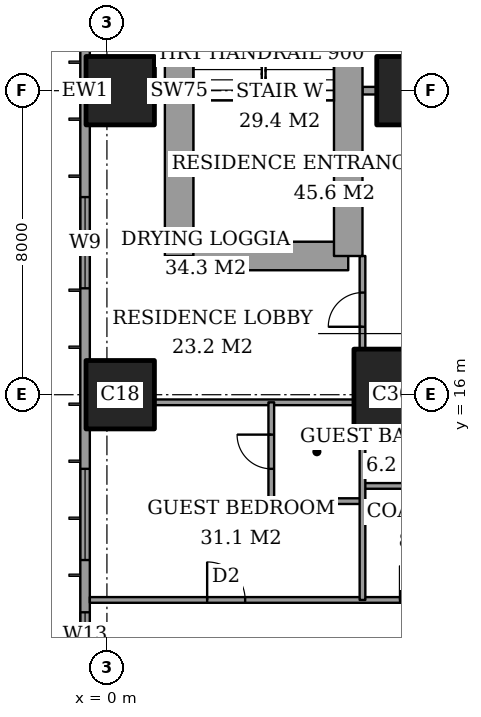
"""IFC4 building model, lengths in metres.
Left out: names, types, materials, properties, quantities, classifications, styles, units other than length and angle.
Written with IfcOpenShell. Run it as: python <this file> out.ifc"""

import sys

from ifc_helpers import new_model, si_unit, direction, frame, frame_2d, origin, origin_2d, place, context, subcontext, project, spatial, rectangle, extrude, element, fill, save


model = new_model("IFC4")
c1 = context("Model", 3, precision=1e-05, world=origin(), true_north=direction((0.0, 1.0)))
c2 = subcontext(c1, "Body", "Model", "MODEL_VIEW")
j1 = project(units=[si_unit("LENGTHUNIT", "METRE"), si_unit("PLANEANGLEUNIT", "RADIAN")], contexts=[c1])
p1 = place(None, origin())
s1 = spatial("IfcSite", under=j1, at=p1, CompositionType="ELEMENT")
p2 = place(p1, origin())
s2 = spatial("IfcBuilding", under=s1, at=p2, CompositionType="ELEMENT")
p3 = place(p2, frame((0.0, 0.0, 196.6)))
s3 = spatial("IfcBuildingStorey", under=s2, at=p3, CompositionType="ELEMENT", Elevation=196.6)
for number, where, z_axis, x_axis in (
    (1, (0.35, 16.0, 0.0), (0.0, 0.0, 1.0), (1.0, 0.0, 0.0)),
    (2, (0.35, 24.0, 0.0), (0.0, 0.0, 1.0), (1.0, 0.0, 0.0)),
):
    element("IfcColumn", number, at=place(p3, frame(where, z_axis=z_axis, x_axis=x_axis)), inside=s3, PredefinedType="COLUMN", context=c2, shape_type="SweptSolid", body=[
        extrude(rectangle(XDim=1.8, YDim=1.8, at=origin_2d()), origin(), (0.0, 0.0, 1.0), 3.6),
    ])
p4 = place(p3, frame((8.0, 16.0, 0.0), z_axis=(0.0, 0.0, 1.0), x_axis=(1.0, 0.0, 0.0)))
e3 = element("IfcColumn", 3, at=p4, inside=s3, PredefinedType="COLUMN", context=c2, shape_type="SweptSolid", body=[
    extrude(rectangle(XDim=3.0, YDim=2.4, at=origin_2d()), origin(), (0.0, 0.0, 1.0), 3.6),
])
p5 = place(p3, frame((8.0, 24.0, 0.0), z_axis=(0.0, 0.0, 1.0), x_axis=(1.0, 0.0, 0.0)))
e4 = element("IfcColumn", 4, at=p5, inside=s3, PredefinedType="COLUMN", context=c2, shape_type="SweptSolid", body=[
    extrude(rectangle(XDim=1.8, YDim=1.8, at=origin_2d()), origin(), (0.0, 0.0, 1.0), 3.6),
])
p6 = place(p3, frame((1.9, 19.65, 0.0), z_axis=(0.0, 0.0, 1.0), x_axis=(1.0, 0.0, 0.0)))
e5 = element("IfcWall", 5, at=p6, inside=s3, PredefinedType="SHEAR", context=c2, shape_type="SweptSolid", body=[
    extrude(rectangle(XDim=4.45, YDim=0.75, at=frame_2d((2.225, 0.0))), origin(), (0.0, 0.0, 1.0), 3.6),
])
p7 = place(p3, frame((6.35, 19.65, 0.0), z_axis=(0.0, 0.0, 1.0), x_axis=(0.0, 1.0, 0.0)))
e6 = element("IfcWall", 6, at=p7, inside=s3, PredefinedType="SHEAR", context=c2, shape_type="SweptSolid", body=[
    extrude(rectangle(XDim=8.7, YDim=0.75, at=frame_2d((4.35, 0.0))), origin(), (0.0, 0.0, 1.0), 3.6),
])
p8 = place(p7, frame((6.725, 0.0, 0.0)))
e7 = element("IfcOpeningElement", 7, at=p8, cuts=e6, PredefinedType="OPENING", context=c2, shape_type="SweptSolid", body=[
    extrude(rectangle(XDim=1.0, YDim=2.1, at=frame_2d((0.5, 1.05))), frame((0.0, 0.385, 0.0), z_axis=(0.0, -1.0, 0.0), x_axis=(1.0, 0.0, 0.0)), (0.0, 0.0, 1.0), 0.77),
])
p9 = place(p3, frame((1.9, 28.35, 0.0), z_axis=(0.0, 0.0, 1.0), x_axis=(0.0, -1.0, 0.0)))
e8 = element("IfcWall", 8, at=p9, inside=s3, PredefinedType="SHEAR", context=c2, shape_type="SweptSolid", body=[
    extrude(rectangle(XDim=8.7, YDim=0.75, at=frame_2d((4.35, 0.0))), origin(), (0.0, 0.0, 1.0), 3.6),
])
p10 = place(p3, frame((-0.575, 44.825, 0.0), z_axis=(0.0, 0.0, 1.0), x_axis=(0.0, -1.0, 0.0)))
e9 = element("IfcWall", 9, at=p10, inside=s3, PredefinedType="SOLIDWALL", context=c2, shape_type="SweptSolid", body=[
    extrude(rectangle(XDim=41.65, YDim=0.25, at=frame_2d((20.825, 0.0))), origin(), (0.0, 0.0, 1.0), 3.6),
])
p11 = place(p10, frame((0.825, 0.0, 0.2)))
e10 = element("IfcOpeningElement", 10, at=p11, cuts=e9, PredefinedType="OPENING", context=c2, shape_type="SweptSolid", body=[
    extrude(rectangle(XDim=2.4, YDim=2.4, at=frame_2d((1.2, 1.2))), frame((0.0, 0.135, 0.0), z_axis=(0.0, -1.0, 0.0), x_axis=(1.0, 0.0, 0.0)), (0.0, 0.0, 1.0), 0.27),
])
p12 = place(p10, frame((6.05, 0.0, 0.2)))
e11 = element("IfcOpeningElement", 11, at=p12, cuts=e9, PredefinedType="OPENING", context=c2, shape_type="SweptSolid", body=[
    extrude(rectangle(XDim=1.2, YDim=2.4, at=frame_2d((0.6, 1.2))), frame((0.0, 0.135, 0.0), z_axis=(0.0, -1.0, 0.0), x_axis=(1.0, 0.0, 0.0)), (0.0, 0.0, 1.0), 0.27),
])
p13 = place(p10, frame((8.225, 0.0, 0.2)))
e12 = element("IfcOpeningElement", 12, at=p13, cuts=e9, PredefinedType="OPENING", context=c2, shape_type="SweptSolid", body=[
    extrude(rectangle(XDim=2.4, YDim=2.4, at=frame_2d((1.2, 1.2))), frame((0.0, 0.135, 0.0), z_axis=(0.0, -1.0, 0.0), x_axis=(1.0, 0.0, 0.0)), (0.0, 0.0, 1.0), 0.27),
])
p14 = place(p10, frame((15.625, 0.0, 0.2)))
e13 = element("IfcOpeningElement", 13, at=p14, cuts=e9, PredefinedType="OPENING", context=c2, shape_type="SweptSolid", body=[
    extrude(rectangle(XDim=2.4, YDim=2.4, at=frame_2d((1.2, 1.2))), frame((0.0, 0.135, 0.0), z_axis=(0.0, -1.0, 0.0), x_axis=(1.0, 0.0, 0.0)), (0.0, 0.0, 1.0), 0.27),
])
p15 = place(p10, frame((23.625, 0.0, 0.2)))
e14 = element("IfcOpeningElement", 14, at=p15, cuts=e9, PredefinedType="OPENING", context=c2, shape_type="SweptSolid", body=[
    extrude(rectangle(XDim=2.4, YDim=2.4, at=frame_2d((1.2, 1.2))), frame((0.0, 0.135, 0.0), z_axis=(0.0, -1.0, 0.0), x_axis=(1.0, 0.0, 0.0)), (0.0, 0.0, 1.0), 0.27),
])
p16 = place(p10, frame((30.775, 0.0, 0.2)))
e15 = element("IfcOpeningElement", 15, at=p16, cuts=e9, PredefinedType="OPENING", context=c2, shape_type="SweptSolid", body=[
    extrude(rectangle(XDim=2.4, YDim=2.4, at=frame_2d((1.2, 1.2))), frame((0.0, 0.135, 0.0), z_axis=(0.0, -1.0, 0.0), x_axis=(1.0, 0.0, 0.0)), (0.0, 0.0, 1.0), 0.27),
])
p17 = place(p10, frame((34.55, 0.0, 0.2)))
e16 = element("IfcOpeningElement", 16, at=p17, cuts=e9, PredefinedType="OPENING", context=c2, shape_type="SweptSolid", body=[
    extrude(rectangle(XDim=1.2, YDim=2.4, at=frame_2d((0.6, 1.2))), frame((0.0, 0.135, 0.0), z_axis=(0.0, -1.0, 0.0), x_axis=(1.0, 0.0, 0.0)), (0.0, 0.0, 1.0), 0.27),
])
p18 = place(p10, frame((38.425, 0.0, 0.2)))
e17 = element("IfcOpeningElement", 17, at=p18, cuts=e9, PredefinedType="OPENING", context=c2, shape_type="SweptSolid", body=[
    extrude(rectangle(XDim=2.4, YDim=2.4, at=frame_2d((1.2, 1.2))), frame((0.0, 0.135, 0.0), z_axis=(0.0, -1.0, 0.0), x_axis=(1.0, 0.0, 0.0)), (0.0, 0.0, 1.0), 0.27),
])
p19 = place(p3, frame((-0.45, 10.6, 0.0), z_axis=(0.0, 0.0, 1.0), x_axis=(1.0, 0.0, 0.0)))
e18 = element("IfcWall", 18, at=p19, inside=s3, PredefinedType="PARTITIONING", context=c2, shape_type="SweptSolid", body=[
    extrude(rectangle(XDim=25.011, YDim=0.15, at=frame_2d((12.505, 0.0))), origin(), (0.0, 0.0, 1.0), 3.35),
])
p20 = place(p19, frame((10.65, 0.0, 0.0)))
e19 = element("IfcOpeningElement", 19, at=p20, cuts=e18, PredefinedType="OPENING", context=c2, shape_type="SweptSolid", body=[
    extrude(rectangle(XDim=1.0, YDim=2.1, at=frame_2d((0.5, 1.05))), frame((0.0, 0.085, 0.0), z_axis=(0.0, -1.0, 0.0), x_axis=(1.0, 0.0, 0.0)), (0.0, 0.0, 1.0), 0.17),
])
p21 = place(p19, frame((3.087, 0.0, 0.0)))
e20 = element("IfcOpeningElement", 20, at=p21, cuts=e18, PredefinedType="OPENING", context=c2, shape_type="SweptSolid", body=[
    extrude(rectangle(XDim=1.0, YDim=2.1, at=frame_2d((0.5, 1.05))), frame((0.0, 0.085, 0.0), z_axis=(0.0, -1.0, 0.0), x_axis=(1.0, 0.0, 0.0)), (0.0, 0.0, 1.0), 0.17),
])
p22 = place(p19, frame((8.163, 0.0, 0.0)))
e21 = element("IfcOpeningElement", 21, at=p22, cuts=e18, PredefinedType="OPENING", context=c2, shape_type="SweptSolid", body=[
    extrude(rectangle(XDim=0.9, YDim=2.1, at=frame_2d((0.45, 1.05))), frame((0.0, 0.085, 0.0), z_axis=(0.0, -1.0, 0.0), x_axis=(1.0, 0.0, 0.0)), (0.0, 0.0, 1.0), 0.17),
])
p23 = place(p19, frame((13.35, 0.0, 0.0)))
e22 = element("IfcOpeningElement", 22, at=p23, cuts=e18, PredefinedType="OPENING", context=c2, shape_type="SweptSolid", body=[
    extrude(rectangle(XDim=1.0, YDim=2.1, at=frame_2d((0.5, 1.05))), frame((0.0, 0.085, 0.0), z_axis=(0.0, -1.0, 0.0), x_axis=(1.0, 0.0, 0.0)), (0.0, 0.0, 1.0), 0.17),
])
p24 = place(p19, frame((16.5, 0.0, 0.0)))
e23 = element("IfcOpeningElement", 23, at=p24, cuts=e18, PredefinedType="OPENING", context=c2, shape_type="SweptSolid", body=[
    extrude(rectangle(XDim=0.9, YDim=2.1, at=frame_2d((0.45, 1.05))), frame((0.0, 0.085, 0.0), z_axis=(0.0, -1.0, 0.0), x_axis=(1.0, 0.0, 0.0)), (0.0, 0.0, 1.0), 0.17),
])
p25 = place(p19, frame((21.175, 0.0, 0.0)))
e24 = element("IfcOpeningElement", 24, at=p25, cuts=e18, PredefinedType="OPENING", context=c2, shape_type="SweptSolid", body=[
    extrude(rectangle(XDim=1.0, YDim=2.1, at=frame_2d((0.5, 1.05))), frame((0.0, 0.085, 0.0), z_axis=(0.0, -1.0, 0.0), x_axis=(1.0, 0.0, 0.0)), (0.0, 0.0, 1.0), 0.17),
])
p26 = place(p3, frame((4.325, 13.2, 0.0), z_axis=(0.0, 0.0, 1.0), x_axis=(1.0, 0.0, 0.0)))
e25 = element("IfcWall", 25, at=p26, inside=s3, PredefinedType="PARTITIONING", context=c2, shape_type="SweptSolid", body=[
    extrude(rectangle(XDim=2.4, YDim=0.15, at=frame_2d((1.2, 0.0))), origin(), (0.0, 0.0, 1.0), 3.35),
])
p27 = place(p3, frame((6.725, 13.6, 0.0), z_axis=(0.0, 0.0, 1.0), x_axis=(1.0, 0.0, 0.0)))
e26 = element("IfcWall", 26, at=p27, inside=s3, PredefinedType="PARTITIONING", context=c2, shape_type="SweptSolid", body=[
    extrude(rectangle(XDim=2.875, YDim=0.15, at=frame_2d((1.438, 0.0))), origin(), (0.0, 0.0, 1.0), 3.35),
])
p28 = place(p3, frame((1.25, 15.8, 0.0), z_axis=(0.0, 0.0, 1.0), x_axis=(1.0, 0.0, 0.0)))
e27 = element("IfcWall", 27, at=p28, inside=s3, PredefinedType="PARTITIONING", context=c2, shape_type="SweptSolid", body=[
    extrude(rectangle(XDim=5.25, YDim=0.15, at=frame_2d((2.625, 0.0))), origin(), (0.0, 0.0, 1.0), 3.35),
])
p29 = place(p3, frame((6.725, 24.0, 0.0), z_axis=(0.0, 0.0, 1.0), x_axis=(1.0, 0.0, 0.0)))
e28 = element("IfcWall", 28, at=p29, inside=s3, PredefinedType="PARTITIONING", context=c2, shape_type="SweptSolid", body=[
    extrude(rectangle(XDim=0.375, YDim=0.2, at=frame_2d((0.188, 0.0))), origin(), (0.0, 0.0, 1.0), 3.35),
])
p30 = place(p3, frame((4.325, 13.2, 0.0), z_axis=(0.0, 0.0, 1.0), x_axis=(0.0, 1.0, 0.0)))
e29 = element("IfcWall", 29, at=p30, inside=s3, PredefinedType="PARTITIONING", context=c2, shape_type="SweptSolid", body=[
    extrude(rectangle(XDim=2.6, YDim=0.15, at=frame_2d((1.3, 0.0))), origin(), (0.0, 0.0, 1.0), 3.35),
])
p31 = place(p30, frame((0.85, 0.0, 0.0)))
e30 = element("IfcOpeningElement", 30, at=p31, cuts=e29, PredefinedType="OPENING", context=c2, shape_type="SweptSolid", body=[
    extrude(rectangle(XDim=0.9, YDim=2.1, at=frame_2d((0.45, 1.05))), frame((0.0, 0.085, 0.0), z_axis=(0.0, -1.0, 0.0), x_axis=(1.0, 0.0, 0.0)), (0.0, 0.0, 1.0), 0.17),
])
p32 = place(p3, frame((6.725, 10.6, 0.0), z_axis=(0.0, 0.0, 1.0), x_axis=(0.0, 1.0, 0.0)))
e31 = element("IfcWall", 31, at=p32, inside=s3, PredefinedType="PARTITIONING", context=c2, shape_type="SweptSolid", body=[
    extrude(rectangle(XDim=4.2, YDim=0.15, at=frame_2d((2.1, 0.0))), origin(), (0.0, 0.0, 1.0), 3.35),
])
p33 = place(p3, frame((6.725, 17.2, 0.0), z_axis=(0.0, 0.0, 1.0), x_axis=(0.0, 1.0, 0.0)))
e32 = element("IfcWall", 32, at=p33, inside=s3, PredefinedType="PARTITIONING", context=c2, shape_type="SweptSolid", body=[
    extrude(rectangle(XDim=2.45, YDim=0.15, at=frame_2d((1.225, 0.0))), origin(), (0.0, 0.0, 1.0), 3.35),
])
p34 = place(p33, frame((0.587, 0.0, 0.0)))
e33 = element("IfcOpeningElement", 33, at=p34, cuts=e32, PredefinedType="OPENING", context=c2, shape_type="SweptSolid", body=[
    extrude(rectangle(XDim=0.9, YDim=2.1, at=frame_2d((0.45, 1.05))), frame((0.0, 0.085, 0.0), z_axis=(0.0, -1.0, 0.0), x_axis=(1.0, 0.0, 0.0)), (0.0, 0.0, 1.0), 0.17),
])
p35 = place(p15, origin())
e34 = element("IfcWindow", 34, at=p35, inside=s3, PartitioningType="SINGLE_PANEL", PredefinedType="WINDOW", context=c2, shape_type="SweptSolid", body=[
    extrude(rectangle(XDim=2.4, YDim=2.4, at=frame_2d((1.2, 1.2))), frame((0.0, 0.03, 0.0), z_axis=(0.0, -1.0, 0.0), x_axis=(1.0, 0.0, 0.0)), (0.0, 0.0, 1.0), 0.06),
])
fill(e14, e34)
p36 = place(p16, origin())
e35 = element("IfcWindow", 35, at=p36, inside=s3, PartitioningType="SINGLE_PANEL", PredefinedType="WINDOW", context=c2, shape_type="SweptSolid", body=[
    extrude(rectangle(XDim=2.4, YDim=2.4, at=frame_2d((1.2, 1.2))), frame((0.0, 0.03, 0.0), z_axis=(0.0, -1.0, 0.0), x_axis=(1.0, 0.0, 0.0)), (0.0, 0.0, 1.0), 0.06),
])
fill(e15, e35)
p37 = place(p17, origin())
e36 = element("IfcWindow", 36, at=p37, inside=s3, PartitioningType="SINGLE_PANEL", PredefinedType="WINDOW", context=c2, shape_type="SweptSolid", body=[
    extrude(rectangle(XDim=1.2, YDim=2.4, at=frame_2d((0.6, 1.2))), frame((0.0, 0.03, 0.0), z_axis=(0.0, -1.0, 0.0), x_axis=(1.0, 0.0, 0.0)), (0.0, 0.0, 1.0), 0.06),
])
fill(e16, e36)
p38 = place(p31, origin())
e37 = element("IfcDoor", 37, at=p38, inside=s3, OperationType="SINGLE_SWING_LEFT", PredefinedType="DOOR", context=c2, shape_type="SweptSolid", body=[
    extrude(rectangle(XDim=0.9, YDim=2.1, at=frame_2d((0.45, 1.05))), frame((0.0, 0.025, 0.0), z_axis=(0.0, -1.0, 0.0), x_axis=(1.0, 0.0, 0.0)), (0.0, 0.0, 1.0), 0.05),
])
fill(e30, e37)
p39 = place(p21, origin())
e38 = element("IfcDoor", 38, at=p39, inside=s3, OperationType="SINGLE_SWING_RIGHT", PredefinedType="DOOR", context=c2, shape_type="SweptSolid", body=[
    extrude(rectangle(XDim=1.0, YDim=2.1, at=frame_2d((0.5, 1.05))), frame((0.0, 0.025, 0.0), z_axis=(0.0, -1.0, 0.0), x_axis=(1.0, 0.0, 0.0)), (0.0, 0.0, 1.0), 0.05),
])
fill(e20, e38)
p40 = place(p34, origin())
e39 = element("IfcDoor", 39, at=p40, inside=s3, OperationType="SINGLE_SWING_RIGHT", PredefinedType="DOOR", context=c2, shape_type="SweptSolid", body=[
    extrude(rectangle(XDim=0.9, YDim=2.1, at=frame_2d((0.45, 1.05))), frame((0.0, 0.025, 0.0), z_axis=(0.0, -1.0, 0.0), x_axis=(1.0, 0.0, 0.0)), (0.0, 0.0, 1.0), 0.05),
])
fill(e33, e39)
p41 = place(p22, origin())
e40 = element("IfcDoor", 40, at=p41, inside=s3, OperationType="SINGLE_SWING_RIGHT", PredefinedType="DOOR", context=c2, shape_type="SweptSolid", body=[
    extrude(rectangle(XDim=0.9, YDim=2.1, at=frame_2d((0.45, 1.05))), frame((0.0, 0.025, 0.0), z_axis=(0.0, -1.0, 0.0), x_axis=(1.0, 0.0, 0.0)), (0.0, 0.0, 1.0), 0.05),
])
fill(e21, e40)
save(model, sys.argv[1])
